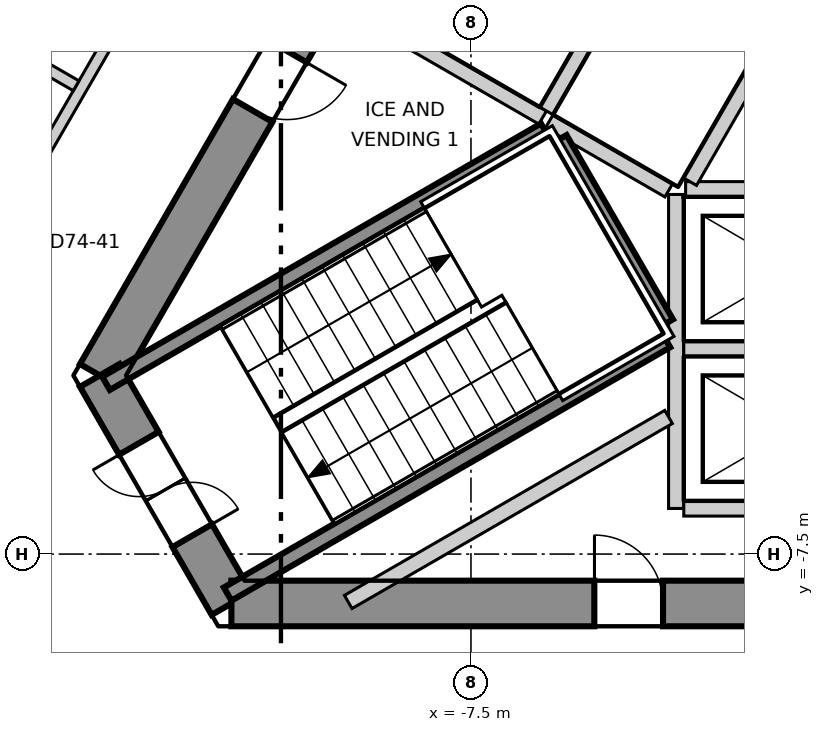
"""IFC4 building model, lengths in metres.
Left out: names, types, materials, properties, quantities, classifications, styles, units other than length and angle.
Written with IfcOpenShell. Run it as: python <this file> out.ifc"""

import sys

from ifc_helpers import new_model, si_unit, direction, frame, frame_2d, origin, place, context, subcontext, project, spatial, polyline, rectangle, outline, extrude, element, fill, save


model = new_model("IFC4")
c1 = context("Model", 3, precision=1e-05, world=origin(), true_north=direction((0.0, 1.0)))
c2 = subcontext(c1, "Body", "Model", "MODEL_VIEW")
j1 = project(units=[si_unit("LENGTHUNIT", "METRE"), si_unit("PLANEANGLEUNIT", "RADIAN")], contexts=[c1])
p1 = place(None, origin())
s1 = spatial("IfcSite", under=j1, at=p1, CompositionType="ELEMENT")
p2 = place(p1, origin())
s2 = spatial("IfcBuilding", under=s1, at=p2, CompositionType="ELEMENT")
p3 = place(p2, frame((0.0, 0.0, 311.5)))
s3 = spatial("IfcBuildingStorey", under=s2, at=p3, CompositionType="ELEMENT", Elevation=311.5)
p4 = place(p3, frame((-1.732, 13.3, -0.3), z_axis=(0.0, 0.0, 1.0), x_axis=(-0.500000539815, -0.866025092122, 0.0)))
e1 = element("IfcWall", 1, at=p4, inside=s3, PredefinedType="SHEAR", context=c2, shape_type="SweptSolid", body=[
    extrude(outline(polyline([(-0.173, -0.3), (1.795, -0.3), (3.763, -0.3), (5.732, -0.3), (7.7, -0.3), (9.668, -0.301), (11.637, -0.301), (13.605, -0.301), (15.573, -0.301), (17.542, -0.301), (19.51, -0.301), (21.478, -0.301), (21.131, 0.3), (19.226, 0.3), (17.321, 0.3), (15.415, 0.3), (13.51, 0.3), (11.605, 0.3), (9.699, 0.3), (7.794, 0.3), (5.889, 0.3), (3.984, 0.3), (2.078, 0.3), (0.173, 0.3), (-0.173, -0.3)])), origin(), (0.0, 0.0, 1.0), 3.6),
])
p5 = place(p4, frame((10.102, 0.0, 0.3)))
e2 = element("IfcOpeningElement", 2, at=p5, cuts=e1, PredefinedType="OPENING", context=c2, shape_type="SweptSolid", body=[
    extrude(rectangle(XDim=1.1, YDim=2.1, at=frame_2d((0.55, 1.05))), frame((0.0, 0.31, 0.0), z_axis=(0.0, -1.0, 0.0), x_axis=(1.0, 0.0, 0.0)), (0.0, 0.0, 1.0), 0.621),
])
p6 = place(p4, frame((16.378, 0.0, 0.3)))
e3 = element("IfcOpeningElement", 3, at=p6, cuts=e1, PredefinedType="OPENING", context=c2, shape_type="SweptSolid", body=[
    extrude(rectangle(XDim=0.9, YDim=2.1, at=frame_2d((0.45, 1.05))), frame((0.0, 0.31, 0.0), z_axis=(0.0, -1.0, 0.0), x_axis=(1.0, 0.0, 0.0)), (0.0, 0.0, 1.0), 0.621),
])
p7 = place(p4, frame((4.106, 0.0, 0.3)))
e4 = element("IfcOpeningElement", 4, at=p7, cuts=e1, PredefinedType="OPENING", context=c2, shape_type="SweptSolid", body=[
    extrude(rectangle(XDim=1.0, YDim=2.1, at=frame_2d((0.5, 1.05))), frame((0.0, 0.31, 0.0), z_axis=(0.0, -1.0, 0.0), x_axis=(1.0, 0.0, 0.0)), (0.0, 0.0, 1.0), 0.621),
])
p8 = place(p3, frame((-12.384, -5.15, -0.3), z_axis=(0.0, 0.0, 1.0), x_axis=(0.49997462182, -0.866040055388, 0.0)))
e5 = element("IfcWall", 5, at=p8, inside=s3, PredefinedType="SHEAR", context=c2, shape_type="SweptSolid", body=[
    extrude(outline(polyline([(-0.173, -0.301), (1.732, -0.301), (3.637, -0.3), (3.291, 0.3), (1.732, 0.3), (0.173, 0.3), (-0.173, -0.301)])), origin(), (0.0, 0.0, 1.0), 3.6),
])
p9 = place(p8, frame((1.032, 0.0, 0.3)))
e6 = element("IfcOpeningElement", 6, at=p9, cuts=e5, PredefinedType="OPENING", context=c2, shape_type="SweptSolid", body=[
    extrude(rectangle(XDim=1.4, YDim=2.1, at=frame_2d((0.7, 1.05))), frame((0.0, 0.31, 0.0), z_axis=(0.0, -1.0, 0.0), x_axis=(1.0, 0.0, 0.0)), (0.0, 0.0, 1.0), 0.621),
])
p10 = place(p3, frame((-10.652, -8.15, -0.3), z_axis=(0.0, 0.0, 1.0), x_axis=(1.0, 0.0, 0.0)))
e7 = element("IfcWall", 7, at=p10, inside=s3, PredefinedType="SHEAR", context=c2, shape_type="SweptSolid", body=[
    extrude(outline(polyline([(-0.173, -0.3), (1.795, -0.3), (3.763, -0.3), (5.731, -0.3), (7.7, -0.3), (9.668, -0.3), (11.636, -0.3), (13.604, -0.3), (15.573, -0.3), (17.541, -0.3), (19.509, -0.3), (21.477, -0.3), (21.131, 0.3), (19.226, 0.3), (17.321, 0.3), (15.415, 0.3), (13.51, 0.3), (11.605, 0.3), (9.699, 0.3), (7.794, 0.3), (5.889, 0.3), (3.984, 0.3), (2.078, 0.3), (0.173, 0.3), (-0.173, -0.3)])), origin(), (0.0, 0.0, 1.0), 3.6),
])
p11 = place(p10, frame((9.752, 0.0, 0.3)))
e8 = element("IfcOpeningElement", 8, at=p11, cuts=e7, PredefinedType="OPENING", context=c2, shape_type="SweptSolid", body=[
    extrude(rectangle(XDim=1.8, YDim=2.1, at=frame_2d((0.9, 1.05))), frame((0.0, 0.31, 0.0), z_axis=(0.0, -1.0, 0.0), x_axis=(1.0, 0.0, 0.0)), (0.0, 0.0, 1.0), 0.62),
])
p12 = place(p10, frame((4.777, 0.0, 0.3)))
e9 = element("IfcOpeningElement", 9, at=p12, cuts=e7, PredefinedType="OPENING", context=c2, shape_type="SweptSolid", body=[
    extrude(rectangle(XDim=0.9, YDim=2.1, at=frame_2d((0.45, 1.05))), frame((0.0, 0.31, 0.0), z_axis=(0.0, -1.0, 0.0), x_axis=(1.0, 0.0, 0.0)), (0.0, 0.0, 1.0), 0.62),
])
p13 = place(p10, frame((16.378, 0.0, 0.3)))
e10 = element("IfcOpeningElement", 10, at=p13, cuts=e7, PredefinedType="OPENING", context=c2, shape_type="SweptSolid", body=[
    extrude(rectangle(XDim=0.9, YDim=2.1, at=frame_2d((0.45, 1.05))), frame((0.0, 0.31, 0.0), z_axis=(0.0, -1.0, 0.0), x_axis=(1.0, 0.0, 0.0)), (0.0, 0.0, 1.0), 0.62),
])
p14 = place(p3, frame((-2.412, 26.948, 0.0), z_axis=(0.0, 0.0, 1.0), x_axis=(-0.500002044679, -0.866024223285, 0.0)))
e11 = element("IfcWall", 11, at=p14, inside=s3, PredefinedType="ELEMENTEDWALL", context=c2, shape_type="SweptSolid", body=[
    extrude(rectangle(XDim=44.243, YDim=0.2, at=frame_2d((22.122, 0.0))), origin(), (0.0, 0.0, 1.0), 3.3),
])
p15 = place(p14, frame((2.056, 0.0, 0.9)))
e12 = element("IfcOpeningElement", 12, at=p15, cuts=e11, PredefinedType="OPENING", context=c2, shape_type="SweptSolid", body=[
    extrude(rectangle(XDim=3.7, YDim=2.2, at=frame_2d((1.85, 1.1))), frame((0.0, 0.11, 0.0), z_axis=(0.0, -1.0, 0.0), x_axis=(1.0, 0.0, 0.0)), (0.0, 0.0, 1.0), 0.22),
])
p16 = place(p14, frame((7.263, 0.0, 0.9)))
e13 = element("IfcOpeningElement", 13, at=p16, cuts=e11, PredefinedType="OPENING", context=c2, shape_type="SweptSolid", body=[
    extrude(rectangle(XDim=3.7, YDim=2.2, at=frame_2d((1.85, 1.1))), frame((0.0, 0.11, 0.0), z_axis=(0.0, -1.0, 0.0), x_axis=(1.0, 0.0, 0.0)), (0.0, 0.0, 1.0), 0.22),
])
p17 = place(p14, frame((12.471, 0.0, 0.9)))
e14 = element("IfcOpeningElement", 14, at=p17, cuts=e11, PredefinedType="OPENING", context=c2, shape_type="SweptSolid", body=[
    extrude(rectangle(XDim=3.7, YDim=2.2, at=frame_2d((1.85, 1.1))), frame((0.0, 0.11, 0.0), z_axis=(0.0, -1.0, 0.0), x_axis=(1.0, 0.0, 0.0)), (0.0, 0.0, 1.0), 0.22),
])
p18 = place(p14, frame((17.678, 0.0, 0.9)))
e15 = element("IfcOpeningElement", 15, at=p18, cuts=e11, PredefinedType="OPENING", context=c2, shape_type="SweptSolid", body=[
    extrude(rectangle(XDim=3.7, YDim=2.2, at=frame_2d((1.85, 1.1))), frame((0.0, 0.11, 0.0), z_axis=(0.0, -1.0, 0.0), x_axis=(1.0, 0.0, 0.0)), (0.0, 0.0, 1.0), 0.22),
])
p19 = place(p14, frame((22.885, 0.0, 0.9)))
e16 = element("IfcOpeningElement", 16, at=p19, cuts=e11, PredefinedType="OPENING", context=c2, shape_type="SweptSolid", body=[
    extrude(rectangle(XDim=3.7, YDim=2.2, at=frame_2d((1.85, 1.1))), frame((0.0, 0.11, 0.0), z_axis=(0.0, -1.0, 0.0), x_axis=(1.0, 0.0, 0.0)), (0.0, 0.0, 1.0), 0.22),
])
p20 = place(p14, frame((28.092, 0.0, 0.9)))
e17 = element("IfcOpeningElement", 17, at=p20, cuts=e11, PredefinedType="OPENING", context=c2, shape_type="SweptSolid", body=[
    extrude(rectangle(XDim=3.7, YDim=2.2, at=frame_2d((1.85, 1.1))), frame((0.0, 0.11, 0.0), z_axis=(0.0, -1.0, 0.0), x_axis=(1.0, 0.0, 0.0)), (0.0, 0.0, 1.0), 0.22),
])
p21 = place(p14, frame((33.3, 0.0, 0.9)))
e18 = element("IfcOpeningElement", 18, at=p21, cuts=e11, PredefinedType="OPENING", context=c2, shape_type="SweptSolid", body=[
    extrude(rectangle(XDim=3.7, YDim=2.2, at=frame_2d((1.85, 1.1))), frame((0.0, 0.11, 0.0), z_axis=(0.0, -1.0, 0.0), x_axis=(1.0, 0.0, 0.0)), (0.0, 0.0, 1.0), 0.22),
])
p22 = place(p14, frame((38.507, 0.0, 0.9)))
e19 = element("IfcOpeningElement", 19, at=p22, cuts=e11, PredefinedType="OPENING", context=c2, shape_type="SweptSolid", body=[
    extrude(rectangle(XDim=3.7, YDim=2.2, at=frame_2d((1.85, 1.1))), frame((0.0, 0.11, 0.0), z_axis=(0.0, -1.0, 0.0), x_axis=(1.0, 0.0, 0.0)), (0.0, 0.0, 1.0), 0.22),
])
p23 = place(p3, frame((-17.678, -10.12, 0.0), z_axis=(0.0, 0.0, 1.0), x_axis=(0.49998824015, 0.86603219323, 0.0)))
e20 = element("IfcWall", 20, at=p23, inside=s3, PredefinedType="PARTITIONING", context=c2, shape_type="SweptSolid", body=[
    extrude(rectangle(XDim=35.357, YDim=0.15, at=frame_2d((17.678, 0.0))), origin(), (0.0, 0.0, 1.0), 3.3),
])
p24 = place(p23, frame((28.607, 0.0, 0.0)))
e21 = element("IfcOpeningElement", 21, at=p24, cuts=e20, PredefinedType="OPENING", context=c2, shape_type="SweptSolid", body=[
    extrude(rectangle(XDim=1.0, YDim=2.1, at=frame_2d((0.5, 1.05))), frame((0.0, 0.085, 0.0), z_axis=(0.0, -1.0, 0.0), x_axis=(1.0, 0.0, 0.0)), (0.0, 0.0, 1.0), 0.17),
])
p25 = place(p23, frame((13.86, 0.0, 0.0)))
e22 = element("IfcOpeningElement", 22, at=p25, cuts=e20, PredefinedType="OPENING", context=c2, shape_type="SweptSolid", body=[
    extrude(rectangle(XDim=1.0, YDim=2.1, at=frame_2d((0.5, 1.05))), frame((0.0, 0.085, 0.0), z_axis=(0.0, -1.0, 0.0), x_axis=(1.0, 0.0, 0.0)), (0.0, 0.0, 1.0), 0.17),
])
p26 = place(p23, frame((18.96, 0.0, 0.0)))
e23 = element("IfcOpeningElement", 23, at=p26, cuts=e20, PredefinedType="OPENING", context=c2, shape_type="SweptSolid", body=[
    extrude(rectangle(XDim=0.9, YDim=2.1, at=frame_2d((0.45, 1.05))), frame((0.0, 0.085, 0.0), z_axis=(0.0, -1.0, 0.0), x_axis=(1.0, 0.0, 0.0)), (0.0, 0.0, 1.0), 0.17),
])
p27 = place(p23, frame((16.86, 0.0, 0.0)))
e24 = element("IfcOpeningElement", 24, at=p27, cuts=e20, PredefinedType="OPENING", context=c2, shape_type="SweptSolid", body=[
    extrude(rectangle(XDim=0.9, YDim=2.1, at=frame_2d((0.45, 1.05))), frame((0.0, 0.085, 0.0), z_axis=(0.0, -1.0, 0.0), x_axis=(1.0, 0.0, 0.0)), (0.0, 0.0, 1.0), 0.17),
])
p28 = place(p23, frame((8.146, 0.0, 0.0)))
e25 = element("IfcOpeningElement", 25, at=p28, cuts=e20, PredefinedType="OPENING", context=c2, shape_type="SweptSolid", body=[
    extrude(rectangle(XDim=1.0, YDim=2.1, at=frame_2d((0.5, 1.05))), frame((0.0, 0.085, 0.0), z_axis=(0.0, -1.0, 0.0), x_axis=(1.0, 0.0, 0.0)), (0.0, 0.0, 1.0), 0.17),
])
p29 = place(p23, frame((3.038, 0.0, 0.0)))
e26 = element("IfcOpeningElement", 26, at=p29, cuts=e20, PredefinedType="OPENING", context=c2, shape_type="SweptSolid", body=[
    extrude(rectangle(XDim=1.0, YDim=2.1, at=frame_2d((0.5, 1.05))), frame((0.0, 0.085, 0.0), z_axis=(0.0, -1.0, 0.0), x_axis=(1.0, 0.0, 0.0)), (0.0, 0.0, 1.0), 0.17),
])
p30 = place(p3, frame((-14.866, -0.085, 0.0), z_axis=(0.0, 0.0, 1.0), x_axis=(0.865890381195, -0.500233793095, 0.0)))
e27 = element("IfcWall", 27, at=p30, inside=s3, PredefinedType="PARTITIONING", context=c2, shape_type="SweptSolid", body=[
    extrude(rectangle(XDim=2.507, YDim=0.15, at=frame_2d((1.253, 0.0))), origin(), (0.0, 0.0, 1.0), 3.3),
])
p31 = place(p30, frame((0.832, 0.0, 0.0)))
e28 = element("IfcOpeningElement", 28, at=p31, cuts=e27, PredefinedType="OPENING", context=c2, shape_type="SweptSolid", body=[
    extrude(rectangle(XDim=0.9, YDim=2.1, at=frame_2d((0.45, 1.05))), frame((0.0, 0.085, 0.0), z_axis=(0.0, -1.0, 0.0), x_axis=(1.0, 0.0, 0.0)), (0.0, 0.0, 1.0), 0.17),
])
p32 = place(p3, frame((-8.376, -0.707, 0.0), z_axis=(0.0, 0.0, 1.0), x_axis=(0.866067520717, -0.499927044236, 0.0)))
e29 = element("IfcWall", 29, at=p32, inside=s3, PredefinedType="SOLIDWALL", context=c2, shape_type="SweptSolid", body=[
    extrude(rectangle(XDim=2.1, YDim=0.2, at=frame_2d((1.05, 0.0))), origin(), (0.0, 0.0, 1.0), 3.3),
])
p33 = place(p3, frame((-4.8, -6.9, 0.0), z_axis=(0.0, 0.0, 1.0), x_axis=(0.0, 1.0, 0.0)))
e30 = element("IfcWall", 30, at=p33, inside=s3, PredefinedType="SOLIDWALL", context=c2, shape_type="SweptSolid", body=[
    extrude(rectangle(XDim=4.131, YDim=0.2, at=frame_2d((2.065, 0.0))), origin(), (0.0, 0.0, 1.0), 3.3),
])
for number, where, z_axis, x_axis in (
    (31, (-4.7, -6.9, 0.0), (0.0, 0.0, 1.0), (1.0, 0.0, 0.0)),
    (32, (-4.7, -4.8, 0.0), (0.0, 0.0, 1.0), (1.0, 0.0, 0.0)),
):
    element("IfcWall", number, at=place(p3, frame(where, z_axis=z_axis, x_axis=x_axis)), inside=s3, PredefinedType="SOLIDWALL", context=c2, shape_type="SweptSolid", body=[
        extrude(rectangle(XDim=2.9, YDim=0.2, at=frame_2d((1.45, 0.0))), origin(), (0.0, 0.0, 1.0), 3.3),
    ])
p34 = place(p3, frame((-4.676, -2.7, 0.0), z_axis=(0.0, 0.0, 1.0), x_axis=(1.0, 0.0, 0.0)))
e33 = element("IfcWall", 33, at=p34, inside=s3, PredefinedType="SOLIDWALL", context=c2, shape_type="SweptSolid", body=[
    extrude(rectangle(XDim=2.873, YDim=0.2, at=frame_2d((1.437, 0.0))), origin(), (0.0, 0.0, 1.0), 3.3),
])
p35 = place(p34, frame((0.937, 0.0, 0.0)))
e34 = element("IfcOpeningElement", 34, at=p35, cuts=e33, PredefinedType="OPENING", context=c2, shape_type="SweptSolid", body=[
    extrude(rectangle(XDim=1.1, YDim=2.1, at=frame_2d((0.55, 1.05))), frame((0.0, 0.11, 0.0), z_axis=(0.0, -1.0, 0.0), x_axis=(1.0, 0.0, 0.0)), (0.0, 0.0, 1.0), 0.22),
])
p36 = place(p3, frame((-6.507, -1.67, 0.0), z_axis=(0.0, 0.0, 1.0), x_axis=(0.50012328804, 0.865954211699, 0.0)))
e35 = element("IfcWall", 35, at=p36, inside=s3, PredefinedType="SOLIDWALL", context=c2, shape_type="SweptSolid", body=[
    extrude(rectangle(XDim=2.9, YDim=0.2, at=frame_2d((1.45, 0.0))), origin(), (0.0, 0.0, 1.0), 3.3),
])
p37 = place(p3, frame((-6.47, -1.807, 0.0), z_axis=(0.0, 0.0, 1.0), x_axis=(0.865883195159, -0.500246231712, 0.0)))
e36 = element("IfcWall", 36, at=p37, inside=s3, PredefinedType="SOLIDWALL", context=c2, shape_type="SweptSolid", body=[
    extrude(rectangle(XDim=1.815, YDim=0.2, at=frame_2d((0.908, 0.0))), origin(), (0.0, 0.0, 1.0), 3.3),
])
p38 = place(p3, frame((-4.619, -2.6, 0.0), z_axis=(0.0, 0.0, 1.0), x_axis=(0.50009492287, 0.865970593103, 0.0)))
e37 = element("IfcWall", 37, at=p38, inside=s3, PredefinedType="SOLIDWALL", context=c2, shape_type="SweptSolid", body=[
    extrude(rectangle(XDim=2.761, YDim=0.2, at=frame_2d((1.381, 0.0))), origin(), (0.0, 0.0, 1.0), 3.3),
])
p39 = place(p3, frame((-9.115, -8.13, 0.0), z_axis=(0.0, 0.0, 1.0), x_axis=(0.866002649306, 0.500039409842, 0.0)))
e38 = element("IfcWall", 38, at=p39, inside=s3, PredefinedType="SOLIDWALL", context=c2, shape_type="SweptSolid", body=[
    extrude(rectangle(XDim=4.867, YDim=0.2, at=frame_2d((2.434, 0.0))), origin(), (0.0, 0.0, 1.0), 3.3),
])
p40 = place(p3, frame((-12.301, -5.254, 0.0), z_axis=(0.0, 0.0, 1.0), x_axis=(0.866068467981, 0.499925403204, 0.0)))
e39 = element("IfcWall", 39, at=p40, inside=s3, PredefinedType="SOLIDWALL", context=c2, shape_type="SweptSolid", body=[
    extrude(rectangle(XDim=6.665, YDim=0.2, at=frame_2d((3.332, 0.0))), origin(), (0.0, 0.0, 1.0), 3.3),
])
p41 = place(p3, frame((-6.329, -2.038, 0.0), z_axis=(0.0, 0.0, 1.0), x_axis=(0.500200581029, -0.865909567298, 0.0)))
e40 = element("IfcWall", 40, at=p41, inside=s3, PredefinedType="SOLIDWALL", context=c2, shape_type="SweptSolid", body=[
    extrude(rectangle(XDim=2.799, YDim=0.2, at=frame_2d((1.399, 0.0))), origin(), (0.0, 0.0, 1.0), 3.3),
])
p42 = place(p3, frame((-10.701, -8.026, 0.0), z_axis=(0.0, 0.0, 1.0), x_axis=(0.866005022404, 0.500035299925, 0.0)))
e41 = element("IfcWall", 41, at=p42, inside=s3, PredefinedType="SOLIDWALL", context=c2, shape_type="SweptSolid", body=[
    extrude(rectangle(XDim=6.665, YDim=0.2, at=frame_2d((3.333, 0.0))), origin(), (0.0, 0.0, 1.0), 3.3),
])
p43 = place(p9, origin())
e42 = element("IfcDoor", 42, at=p43, inside=s3, OperationType="DOUBLE_DOOR_SINGLE_SWING", PredefinedType="DOOR", context=c2, shape_type="SweptSolid", body=[
    extrude(rectangle(XDim=1.4, YDim=2.1, at=frame_2d((0.7, 1.05))), frame((0.0, 0.025, 0.0), z_axis=(0.0, -1.0, 0.0), x_axis=(1.0, 0.0, 0.0)), (0.0, 0.0, 1.0), 0.05),
])
fill(e6, e42)
p44 = place(p6, origin())
e43 = element("IfcDoor", 43, at=p44, inside=s3, OperationType="SINGLE_SWING_RIGHT", PredefinedType="DOOR", context=c2, shape_type="SweptSolid", body=[
    extrude(rectangle(XDim=0.9, YDim=2.1, at=frame_2d((0.45, 1.05))), frame((0.0, 0.025, 0.0), z_axis=(0.0, -1.0, 0.0), x_axis=(1.0, 0.0, 0.0)), (0.0, 0.0, 1.0), 0.05),
])
fill(e3, e43)
p45 = place(p12, origin())
e44 = element("IfcDoor", 44, at=p45, inside=s3, OperationType="SINGLE_SWING_RIGHT", PredefinedType="DOOR", context=c2, shape_type="SweptSolid", body=[
    extrude(rectangle(XDim=0.9, YDim=2.1, at=frame_2d((0.45, 1.05))), frame((0.0, 0.025, 0.0), z_axis=(0.0, -1.0, 0.0), x_axis=(1.0, 0.0, 0.0)), (0.0, 0.0, 1.0), 0.05),
])
fill(e9, e44)
save(model, sys.argv[1])
